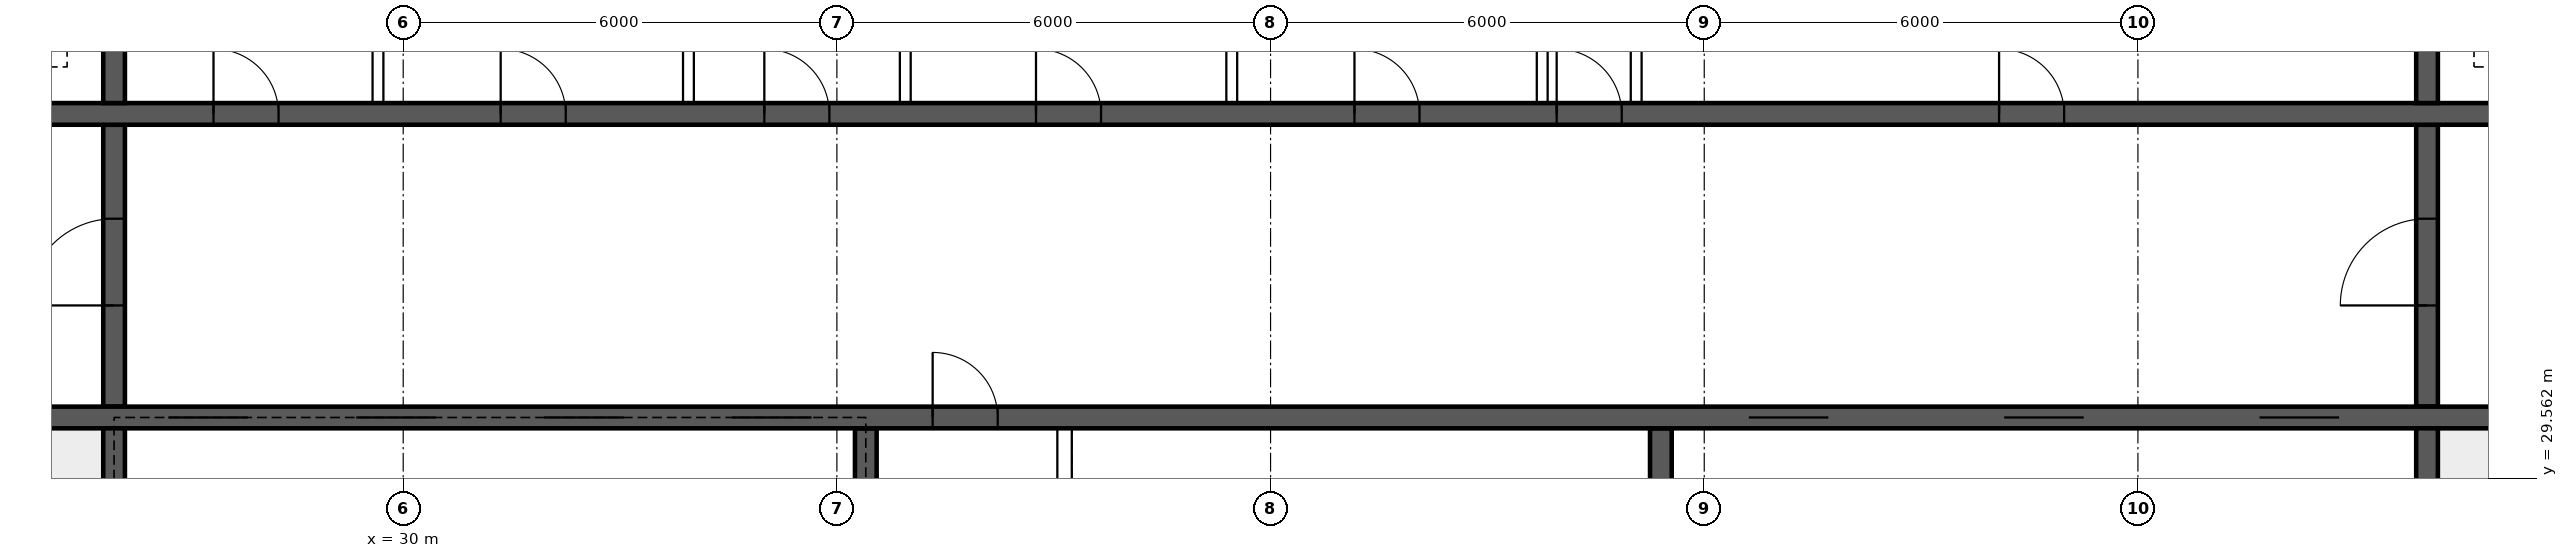
"""IFC4 building model, lengths in metres.
Left out: names, types, materials, properties, quantities, classifications, styles, units other than length and angle.
Written with IfcOpenShell. Run it as: python <this file> out.ifc"""

import sys

from ifc_helpers import new_model, si_unit, direction, frame, frame_2d, origin, place, context, subcontext, project, spatial, rectangle, extrude, element, fill, save


model = new_model("IFC4")
c1 = context("Model", 3, precision=1e-05, world=origin(), true_north=direction((0.0, 1.0)))
c2 = subcontext(c1, "Body", "Model", "MODEL_VIEW")
j1 = project(units=[si_unit("LENGTHUNIT", "METRE"), si_unit("PLANEANGLEUNIT", "RADIAN")], contexts=[c1])
p1 = place(None, origin())
s1 = spatial("IfcSite", under=j1, at=p1, CompositionType="ELEMENT")
p2 = place(p1, origin())
s2 = spatial("IfcBuilding", under=s1, at=p2, CompositionType="ELEMENT")
p3 = place(p2, frame((0.0, 0.0, 129.4)))
s3 = spatial("IfcBuildingStorey", under=s2, at=p3, CompositionType="ELEMENT", Elevation=129.4)
p4 = place(p3, frame((18.475, 30.4, 0.0), z_axis=(0.0, 0.0, 1.0), x_axis=(1.0, 0.0, 0.0)))
e1 = element("IfcWall", 1, at=p4, inside=s3, PredefinedType="SHEAR", context=c2, shape_type="SweptSolid", body=[
    extrude(rectangle(XDim=47.05, YDim=0.3, at=frame_2d((23.525, 0.0))), origin(), (0.0, 0.0, 1.0), 3.75),
])
p5 = place(p4, frame((0.4, 0.0, 0.0)))
e2 = element("IfcOpeningElement", 2, at=p5, cuts=e1, PredefinedType="OPENING", context=c2, shape_type="SweptSolid", body=[
    extrude(rectangle(XDim=1.0, YDim=2.1, at=frame_2d((0.5, 1.05))), frame((0.0, 0.16, 0.0), z_axis=(0.0, -1.0, 0.0), x_axis=(1.0, 0.0, 0.0)), (0.0, 0.0, 1.0), 0.32),
])
p6 = place(p4, frame((45.65, 0.0, 0.0)))
e3 = element("IfcOpeningElement", 3, at=p6, cuts=e1, PredefinedType="OPENING", context=c2, shape_type="SweptSolid", body=[
    extrude(rectangle(XDim=1.0, YDim=2.1, at=frame_2d((0.5, 1.05))), frame((0.0, 0.16, 0.0), z_axis=(0.0, -1.0, 0.0), x_axis=(1.0, 0.0, 0.0)), (0.0, 0.0, 1.0), 0.32),
])
p7 = place(p4, frame((8.275, 0.0, 0.0)))
e4 = element("IfcOpeningElement", 4, at=p7, cuts=e1, PredefinedType="OPENING", context=c2, shape_type="SweptSolid", body=[
    extrude(rectangle(XDim=1.1, YDim=2.1, at=frame_2d((0.55, 1.05))), frame((0.0, 0.16, 0.0), z_axis=(0.0, -1.0, 0.0), x_axis=(1.0, 0.0, 0.0)), (0.0, 0.0, 1.0), 0.32),
])
p8 = place(p4, frame((10.875, 0.0, 0.0)))
e5 = element("IfcOpeningElement", 5, at=p8, cuts=e1, PredefinedType="OPENING", context=c2, shape_type="SweptSolid", body=[
    extrude(rectangle(XDim=1.1, YDim=2.1, at=frame_2d((0.55, 1.05))), frame((0.0, 0.16, 0.0), z_axis=(0.0, -1.0, 0.0), x_axis=(1.0, 0.0, 0.0)), (0.0, 0.0, 1.0), 0.32),
])
p9 = place(p4, frame((13.475, 0.0, 0.0)))
e6 = element("IfcOpeningElement", 6, at=p9, cuts=e1, PredefinedType="OPENING", context=c2, shape_type="SweptSolid", body=[
    extrude(rectangle(XDim=1.1, YDim=2.1, at=frame_2d((0.55, 1.05))), frame((0.0, 0.16, 0.0), z_axis=(0.0, -1.0, 0.0), x_axis=(1.0, 0.0, 0.0)), (0.0, 0.0, 1.0), 0.32),
])
p10 = place(p4, frame((16.075, 0.0, 0.0)))
e7 = element("IfcOpeningElement", 7, at=p10, cuts=e1, PredefinedType="OPENING", context=c2, shape_type="SweptSolid", body=[
    extrude(rectangle(XDim=1.1, YDim=2.1, at=frame_2d((0.55, 1.05))), frame((0.0, 0.16, 0.0), z_axis=(0.0, -1.0, 0.0), x_axis=(1.0, 0.0, 0.0)), (0.0, 0.0, 1.0), 0.32),
])
p11 = place(p4, frame((18.85, 0.0, 0.0)))
e8 = element("IfcOpeningElement", 8, at=p11, cuts=e1, PredefinedType="OPENING", context=c2, shape_type="SweptSolid", body=[
    extrude(rectangle(XDim=0.9, YDim=2.1, at=frame_2d((0.45, 1.05))), frame((0.0, 0.16, 0.0), z_axis=(0.0, -1.0, 0.0), x_axis=(1.0, 0.0, 0.0)), (0.0, 0.0, 1.0), 0.32),
])
p12 = place(p4, frame((30.142, 0.0, 0.0)))
e9 = element("IfcOpeningElement", 9, at=p12, cuts=e1, PredefinedType="OPENING", context=c2, shape_type="SweptSolid", body=[
    extrude(rectangle(XDim=1.1, YDim=2.1, at=frame_2d((0.55, 1.05))), frame((0.0, 0.16, 0.0), z_axis=(0.0, -1.0, 0.0), x_axis=(1.0, 0.0, 0.0)), (0.0, 0.0, 1.0), 0.32),
])
p13 = place(p4, frame((33.675, 0.0, 0.0)))
e10 = element("IfcOpeningElement", 10, at=p13, cuts=e1, PredefinedType="OPENING", context=c2, shape_type="SweptSolid", body=[
    extrude(rectangle(XDim=1.1, YDim=2.1, at=frame_2d((0.55, 1.05))), frame((0.0, 0.16, 0.0), z_axis=(0.0, -1.0, 0.0), x_axis=(1.0, 0.0, 0.0)), (0.0, 0.0, 1.0), 0.32),
])
p14 = place(p4, frame((37.208, 0.0, 0.0)))
e11 = element("IfcOpeningElement", 11, at=p14, cuts=e1, PredefinedType="OPENING", context=c2, shape_type="SweptSolid", body=[
    extrude(rectangle(XDim=1.1, YDim=2.1, at=frame_2d((0.55, 1.05))), frame((0.0, 0.16, 0.0), z_axis=(0.0, -1.0, 0.0), x_axis=(1.0, 0.0, 0.0)), (0.0, 0.0, 1.0), 0.32),
])
p15 = place(p3, frame((18.475, 34.6, 0.0), z_axis=(0.0, 0.0, 1.0), x_axis=(1.0, 0.0, 0.0)))
e12 = element("IfcWall", 12, at=p15, inside=s3, PredefinedType="SHEAR", context=c2, shape_type="SweptSolid", body=[
    extrude(rectangle(XDim=47.05, YDim=0.3, at=frame_2d((23.525, 0.0))), origin(), (0.0, 0.0, 1.0), 3.75),
])
p16 = place(p15, frame((0.9, 0.0, 0.0)))
e13 = element("IfcOpeningElement", 13, at=p16, cuts=e12, PredefinedType="OPENING", context=c2, shape_type="SweptSolid", body=[
    extrude(rectangle(XDim=1.1, YDim=2.1, at=frame_2d((0.55, 1.05))), frame((0.0, 0.16, 0.0), z_axis=(0.0, -1.0, 0.0), x_axis=(1.0, 0.0, 0.0)), (0.0, 0.0, 1.0), 0.32),
])
p17 = place(p15, frame((45.05, 0.0, 0.0)))
e14 = element("IfcOpeningElement", 14, at=p17, cuts=e12, PredefinedType="OPENING", context=c2, shape_type="SweptSolid", body=[
    extrude(rectangle(XDim=1.1, YDim=2.1, at=frame_2d((0.55, 1.05))), frame((0.0, 0.16, 0.0), z_axis=(0.0, -1.0, 0.0), x_axis=(1.0, 0.0, 0.0)), (0.0, 0.0, 1.0), 0.32),
])
p18 = place(p15, frame((4.125, 0.0, 0.0)))
e15 = element("IfcOpeningElement", 15, at=p18, cuts=e12, PredefinedType="OPENING", context=c2, shape_type="SweptSolid", body=[
    extrude(rectangle(XDim=0.9, YDim=2.1, at=frame_2d((0.45, 1.05))), frame((0.0, 0.16, 0.0), z_axis=(0.0, -1.0, 0.0), x_axis=(1.0, 0.0, 0.0)), (0.0, 0.0, 1.0), 0.32),
])
p19 = place(p15, frame((42.025, 0.0, 0.0)))
e16 = element("IfcOpeningElement", 16, at=p19, cuts=e12, PredefinedType="OPENING", context=c2, shape_type="SweptSolid", body=[
    extrude(rectangle(XDim=0.9, YDim=2.1, at=frame_2d((0.45, 1.05))), frame((0.0, 0.16, 0.0), z_axis=(0.0, -1.0, 0.0), x_axis=(1.0, 0.0, 0.0)), (0.0, 0.0, 1.0), 0.32),
])
p20 = place(p15, frame((8.9, 0.0, 0.0)))
e17 = element("IfcOpeningElement", 17, at=p20, cuts=e12, PredefinedType="OPENING", context=c2, shape_type="SweptSolid", body=[
    extrude(rectangle(XDim=0.9, YDim=2.1, at=frame_2d((0.45, 1.05))), frame((0.0, 0.16, 0.0), z_axis=(0.0, -1.0, 0.0), x_axis=(1.0, 0.0, 0.0)), (0.0, 0.0, 1.0), 0.32),
])
p21 = place(p15, frame((12.874, 0.0, 0.0)))
e18 = element("IfcOpeningElement", 18, at=p21, cuts=e12, PredefinedType="OPENING", context=c2, shape_type="SweptSolid", body=[
    extrude(rectangle(XDim=0.9, YDim=2.1, at=frame_2d((0.45, 1.05))), frame((0.0, 0.16, 0.0), z_axis=(0.0, -1.0, 0.0), x_axis=(1.0, 0.0, 0.0)), (0.0, 0.0, 1.0), 0.32),
])
p22 = place(p15, frame((16.521, 0.0, 0.0)))
e19 = element("IfcOpeningElement", 19, at=p22, cuts=e12, PredefinedType="OPENING", context=c2, shape_type="SweptSolid", body=[
    extrude(rectangle(XDim=0.9, YDim=2.1, at=frame_2d((0.45, 1.05))), frame((0.0, 0.16, 0.0), z_axis=(0.0, -1.0, 0.0), x_axis=(1.0, 0.0, 0.0)), (0.0, 0.0, 1.0), 0.32),
])
p23 = place(p15, frame((20.28, 0.0, 0.0)))
e20 = element("IfcOpeningElement", 20, at=p23, cuts=e12, PredefinedType="OPENING", context=c2, shape_type="SweptSolid", body=[
    extrude(rectangle(XDim=0.9, YDim=2.1, at=frame_2d((0.45, 1.05))), frame((0.0, 0.16, 0.0), z_axis=(0.0, -1.0, 0.0), x_axis=(1.0, 0.0, 0.0)), (0.0, 0.0, 1.0), 0.32),
])
p24 = place(p15, frame((24.686, 0.0, 0.0)))
e21 = element("IfcOpeningElement", 21, at=p24, cuts=e12, PredefinedType="OPENING", context=c2, shape_type="SweptSolid", body=[
    extrude(rectangle(XDim=0.9, YDim=2.1, at=frame_2d((0.45, 1.05))), frame((0.0, 0.16, 0.0), z_axis=(0.0, -1.0, 0.0), x_axis=(1.0, 0.0, 0.0)), (0.0, 0.0, 1.0), 0.32),
])
p25 = place(p15, frame((27.483, 0.0, 0.0)))
e22 = element("IfcOpeningElement", 22, at=p25, cuts=e12, PredefinedType="OPENING", context=c2, shape_type="SweptSolid", body=[
    extrude(rectangle(XDim=0.9, YDim=2.1, at=frame_2d((0.45, 1.05))), frame((0.0, 0.16, 0.0), z_axis=(0.0, -1.0, 0.0), x_axis=(1.0, 0.0, 0.0)), (0.0, 0.0, 1.0), 0.32),
])
p26 = place(p15, frame((33.604, 0.0, 0.0)))
e23 = element("IfcOpeningElement", 23, at=p26, cuts=e12, PredefinedType="OPENING", context=c2, shape_type="SweptSolid", body=[
    extrude(rectangle(XDim=0.9, YDim=2.1, at=frame_2d((0.45, 1.05))), frame((0.0, 0.16, 0.0), z_axis=(0.0, -1.0, 0.0), x_axis=(1.0, 0.0, 0.0)), (0.0, 0.0, 1.0), 0.32),
])
for number, where, z_axis, x_axis in (
    (24, (26.0, 26.275, 0.0), (0.0, 0.0, 1.0), (0.0, 1.0, 0.0)),
    (25, (58.0, 26.275, 0.0), (0.0, 0.0, 1.0), (0.0, 1.0, 0.0)),
):
    element("IfcWall", number, at=place(p3, frame(where, z_axis=z_axis, x_axis=x_axis)), inside=s3, PredefinedType="SHEAR", context=c2, shape_type="SweptSolid", body=[
        extrude(rectangle(XDim=3.975, YDim=0.3, at=frame_2d((1.988, 0.0))), origin(), (0.0, 0.0, 1.0), 3.75),
    ])
p27 = place(p3, frame((26.0, 30.55, 0.0), z_axis=(0.0, 0.0, 1.0), x_axis=(0.0, 1.0, 0.0)))
e26 = element("IfcWall", 26, at=p27, inside=s3, PredefinedType="SHEAR", context=c2, shape_type="SweptSolid", body=[
    extrude(rectangle(XDim=3.9, YDim=0.3, at=frame_2d((1.95, 0.0))), origin(), (0.0, 0.0, 1.0), 3.75),
])
p28 = place(p27, frame((1.4, 0.0, 0.0)))
e27 = element("IfcOpeningElement", 27, at=p28, cuts=e26, PredefinedType="OPENING", context=c2, shape_type="SweptSolid", body=[
    extrude(rectangle(XDim=1.2, YDim=2.1, at=frame_2d((0.6, 1.05))), frame((0.0, 0.16, 0.0), z_axis=(0.0, -1.0, 0.0), x_axis=(1.0, 0.0, 0.0)), (0.0, 0.0, 1.0), 0.32),
])
p29 = place(p3, frame((58.0, 30.55, 0.0), z_axis=(0.0, 0.0, 1.0), x_axis=(0.0, 1.0, 0.0)))
e28 = element("IfcWall", 28, at=p29, inside=s3, PredefinedType="SHEAR", context=c2, shape_type="SweptSolid", body=[
    extrude(rectangle(XDim=3.9, YDim=0.3, at=frame_2d((1.95, 0.0))), origin(), (0.0, 0.0, 1.0), 3.75),
])
p30 = place(p29, frame((1.4, 0.0, 0.0)))
e29 = element("IfcOpeningElement", 29, at=p30, cuts=e28, PredefinedType="OPENING", context=c2, shape_type="SweptSolid", body=[
    extrude(rectangle(XDim=1.2, YDim=2.1, at=frame_2d((0.6, 1.05))), frame((0.0, 0.16, 0.0), z_axis=(0.0, -1.0, 0.0), x_axis=(1.0, 0.0, 0.0)), (0.0, 0.0, 1.0), 0.32),
])
for number, where, z_axis, x_axis in (
    (30, (26.0, 34.75, 0.0), (0.0, 0.0, 1.0), (0.0, 1.0, 0.0)),
    (31, (58.0, 34.75, 0.0), (0.0, 0.0, 1.0), (0.0, 1.0, 0.0)),
):
    element("IfcWall", number, at=place(p3, frame(where, z_axis=z_axis, x_axis=x_axis)), inside=s3, PredefinedType="SHEAR", context=c2, shape_type="SweptSolid", body=[
        extrude(rectangle(XDim=2.975, YDim=0.3, at=frame_2d((1.488, 0.0))), origin(), (0.0, 0.0, 1.0), 3.75),
    ])
for number, where, z_axis, x_axis in (
    (32, (36.4, 26.275, 0.0), (0.0, 0.0, 1.0), (0.0, 1.0, 0.0)),
    (33, (47.4, 26.275, 0.0), (0.0, 0.0, 1.0), (0.0, 1.0, 0.0)),
):
    element("IfcWall", number, at=place(p3, frame(where, z_axis=z_axis, x_axis=x_axis)), inside=s3, PredefinedType="SHEAR", context=c2, shape_type="SweptSolid", body=[
        extrude(rectangle(XDim=3.975, YDim=0.3, at=frame_2d((1.988, 0.0))), origin(), (0.0, 0.0, 1.0), 3.75),
    ])
for number, where, z_axis, x_axis in (
    (34, (29.651, 34.75, 0.0), (0.0, 0.0, 1.0), (0.0, 1.0, 0.0)),
    (35, (33.946, 34.75, 0.0), (0.0, 0.0, 1.0), (0.0, 1.0, 0.0)),
    (36, (36.946, 34.75, 0.0), (0.0, 0.0, 1.0), (0.0, 1.0, 0.0)),
    (37, (41.463, 34.75, 0.0), (0.0, 0.0, 1.0), (0.0, 1.0, 0.0)),
    (38, (45.758, 34.75, 0.0), (0.0, 0.0, 1.0), (0.0, 1.0, 0.0)),
    (39, (47.058, 34.75, 0.0), (0.0, 0.0, 1.0), (0.0, 1.0, 0.0)),
):
    element("IfcWall", number, at=place(p3, frame(where, z_axis=z_axis, x_axis=x_axis)), inside=s3, PredefinedType="SOLIDWALL", context=c2, shape_type="SweptSolid", body=[
        extrude(rectangle(XDim=2.975, YDim=0.15, at=frame_2d((1.488, 0.0))), origin(), (0.0, 0.0, 1.0), 3.4),
    ])
p31 = place(p3, frame((39.15, 26.275, 0.0), z_axis=(0.0, 0.0, 1.0), x_axis=(0.0, 1.0, 0.0)))
e40 = element("IfcWall", 40, at=p31, inside=s3, PredefinedType="SOLIDWALL", context=c2, shape_type="SweptSolid", body=[
    extrude(rectangle(XDim=3.975, YDim=0.2, at=frame_2d((1.988, 0.0))), origin(), (0.0, 0.0, 1.0), 3.4),
])
p32 = place(p28, origin())
e41 = element("IfcDoor", 41, at=p32, inside=s3, OperationType="SINGLE_SWING_LEFT", PredefinedType="DOOR", context=c2, shape_type="SweptSolid", body=[
    extrude(rectangle(XDim=1.2, YDim=2.1, at=frame_2d((0.6, 1.05))), frame((0.0, 0.025, 0.0), z_axis=(0.0, -1.0, 0.0), x_axis=(1.0, 0.0, 0.0)), (0.0, 0.0, 1.0), 0.05),
])
fill(e27, e41)
p33 = place(p30, origin())
e42 = element("IfcDoor", 42, at=p33, inside=s3, OperationType="SINGLE_SWING_LEFT", PredefinedType="DOOR", context=c2, shape_type="SweptSolid", body=[
    extrude(rectangle(XDim=1.2, YDim=2.1, at=frame_2d((0.6, 1.05))), frame((0.0, 0.025, 0.0), z_axis=(0.0, -1.0, 0.0), x_axis=(1.0, 0.0, 0.0)), (0.0, 0.0, 1.0), 0.05),
])
fill(e29, e42)
p34 = place(p20, origin())
e43 = element("IfcDoor", 43, at=p34, inside=s3, OperationType="SINGLE_SWING_LEFT", PredefinedType="DOOR", context=c2, shape_type="SweptSolid", body=[
    extrude(rectangle(XDim=0.9, YDim=2.1, at=frame_2d((0.45, 1.05))), frame((0.0, 0.025, 0.0), z_axis=(0.0, -1.0, 0.0), x_axis=(1.0, 0.0, 0.0)), (0.0, 0.0, 1.0), 0.05),
])
fill(e17, e43)
p35 = place(p21, origin())
e44 = element("IfcDoor", 44, at=p35, inside=s3, OperationType="SINGLE_SWING_LEFT", PredefinedType="DOOR", context=c2, shape_type="SweptSolid", body=[
    extrude(rectangle(XDim=0.9, YDim=2.1, at=frame_2d((0.45, 1.05))), frame((0.0, 0.025, 0.0), z_axis=(0.0, -1.0, 0.0), x_axis=(1.0, 0.0, 0.0)), (0.0, 0.0, 1.0), 0.05),
])
fill(e18, e44)
p36 = place(p22, origin())
e45 = element("IfcDoor", 45, at=p36, inside=s3, OperationType="SINGLE_SWING_LEFT", PredefinedType="DOOR", context=c2, shape_type="SweptSolid", body=[
    extrude(rectangle(XDim=0.9, YDim=2.1, at=frame_2d((0.45, 1.05))), frame((0.0, 0.025, 0.0), z_axis=(0.0, -1.0, 0.0), x_axis=(1.0, 0.0, 0.0)), (0.0, 0.0, 1.0), 0.05),
])
fill(e19, e45)
p37 = place(p23, origin())
e46 = element("IfcDoor", 46, at=p37, inside=s3, OperationType="SINGLE_SWING_LEFT", PredefinedType="DOOR", context=c2, shape_type="SweptSolid", body=[
    extrude(rectangle(XDim=0.9, YDim=2.1, at=frame_2d((0.45, 1.05))), frame((0.0, 0.025, 0.0), z_axis=(0.0, -1.0, 0.0), x_axis=(1.0, 0.0, 0.0)), (0.0, 0.0, 1.0), 0.05),
])
fill(e20, e46)
p38 = place(p24, origin())
e47 = element("IfcDoor", 47, at=p38, inside=s3, OperationType="SINGLE_SWING_LEFT", PredefinedType="DOOR", context=c2, shape_type="SweptSolid", body=[
    extrude(rectangle(XDim=0.9, YDim=2.1, at=frame_2d((0.45, 1.05))), frame((0.0, 0.025, 0.0), z_axis=(0.0, -1.0, 0.0), x_axis=(1.0, 0.0, 0.0)), (0.0, 0.0, 1.0), 0.05),
])
fill(e21, e47)
p39 = place(p25, origin())
e48 = element("IfcDoor", 48, at=p39, inside=s3, OperationType="SINGLE_SWING_LEFT", PredefinedType="DOOR", context=c2, shape_type="SweptSolid", body=[
    extrude(rectangle(XDim=0.9, YDim=2.1, at=frame_2d((0.45, 1.05))), frame((0.0, 0.025, 0.0), z_axis=(0.0, -1.0, 0.0), x_axis=(1.0, 0.0, 0.0)), (0.0, 0.0, 1.0), 0.05),
])
fill(e22, e48)
p40 = place(p26, origin())
e49 = element("IfcDoor", 49, at=p40, inside=s3, OperationType="SINGLE_SWING_LEFT", PredefinedType="DOOR", context=c2, shape_type="SweptSolid", body=[
    extrude(rectangle(XDim=0.9, YDim=2.1, at=frame_2d((0.45, 1.05))), frame((0.0, 0.025, 0.0), z_axis=(0.0, -1.0, 0.0), x_axis=(1.0, 0.0, 0.0)), (0.0, 0.0, 1.0), 0.05),
])
fill(e23, e49)
p41 = place(p7, origin())
e50 = element("IfcDoor", 50, at=p41, inside=s3, OperationType="DOUBLE_DOOR_SLIDING", PredefinedType="DOOR", context=c2, shape_type="SweptSolid", body=[
    extrude(rectangle(XDim=1.1, YDim=2.1, at=frame_2d((0.55, 1.05))), frame((0.0, 0.025, 0.0), z_axis=(0.0, -1.0, 0.0), x_axis=(1.0, 0.0, 0.0)), (0.0, 0.0, 1.0), 0.05),
])
fill(e4, e50)
p42 = place(p8, origin())
e51 = element("IfcDoor", 51, at=p42, inside=s3, OperationType="DOUBLE_DOOR_SLIDING", PredefinedType="DOOR", context=c2, shape_type="SweptSolid", body=[
    extrude(rectangle(XDim=1.1, YDim=2.1, at=frame_2d((0.55, 1.05))), frame((0.0, 0.025, 0.0), z_axis=(0.0, -1.0, 0.0), x_axis=(1.0, 0.0, 0.0)), (0.0, 0.0, 1.0), 0.05),
])
fill(e5, e51)
p43 = place(p9, origin())
e52 = element("IfcDoor", 52, at=p43, inside=s3, OperationType="DOUBLE_DOOR_SLIDING", PredefinedType="DOOR", context=c2, shape_type="SweptSolid", body=[
    extrude(rectangle(XDim=1.1, YDim=2.1, at=frame_2d((0.55, 1.05))), frame((0.0, 0.025, 0.0), z_axis=(0.0, -1.0, 0.0), x_axis=(1.0, 0.0, 0.0)), (0.0, 0.0, 1.0), 0.05),
])
fill(e6, e52)
p44 = place(p10, origin())
e53 = element("IfcDoor", 53, at=p44, inside=s3, OperationType="DOUBLE_DOOR_SLIDING", PredefinedType="DOOR", context=c2, shape_type="SweptSolid", body=[
    extrude(rectangle(XDim=1.1, YDim=2.1, at=frame_2d((0.55, 1.05))), frame((0.0, 0.025, 0.0), z_axis=(0.0, -1.0, 0.0), x_axis=(1.0, 0.0, 0.0)), (0.0, 0.0, 1.0), 0.05),
])
fill(e7, e53)
p45 = place(p11, origin())
e54 = element("IfcDoor", 54, at=p45, inside=s3, OperationType="SINGLE_SWING_LEFT", PredefinedType="DOOR", context=c2, shape_type="SweptSolid", body=[
    extrude(rectangle(XDim=0.9, YDim=2.1, at=frame_2d((0.45, 1.05))), frame((0.0, 0.025, 0.0), z_axis=(0.0, -1.0, 0.0), x_axis=(1.0, 0.0, 0.0)), (0.0, 0.0, 1.0), 0.05),
])
fill(e8, e54)
p46 = place(p12, origin())
e55 = element("IfcDoor", 55, at=p46, inside=s3, OperationType="DOUBLE_DOOR_SLIDING", PredefinedType="DOOR", context=c2, shape_type="SweptSolid", body=[
    extrude(rectangle(XDim=1.1, YDim=2.1, at=frame_2d((0.55, 1.05))), frame((0.0, 0.025, 0.0), z_axis=(0.0, -1.0, 0.0), x_axis=(1.0, 0.0, 0.0)), (0.0, 0.0, 1.0), 0.05),
])
fill(e9, e55)
p47 = place(p13, origin())
e56 = element("IfcDoor", 56, at=p47, inside=s3, OperationType="DOUBLE_DOOR_SLIDING", PredefinedType="DOOR", context=c2, shape_type="SweptSolid", body=[
    extrude(rectangle(XDim=1.1, YDim=2.1, at=frame_2d((0.55, 1.05))), frame((0.0, 0.025, 0.0), z_axis=(0.0, -1.0, 0.0), x_axis=(1.0, 0.0, 0.0)), (0.0, 0.0, 1.0), 0.05),
])
fill(e10, e56)
p48 = place(p14, origin())
e57 = element("IfcDoor", 57, at=p48, inside=s3, OperationType="DOUBLE_DOOR_SLIDING", PredefinedType="DOOR", context=c2, shape_type="SweptSolid", body=[
    extrude(rectangle(XDim=1.1, YDim=2.1, at=frame_2d((0.55, 1.05))), frame((0.0, 0.025, 0.0), z_axis=(0.0, -1.0, 0.0), x_axis=(1.0, 0.0, 0.0)), (0.0, 0.0, 1.0), 0.05),
])
fill(e11, e57)
save(model, sys.argv[1])
